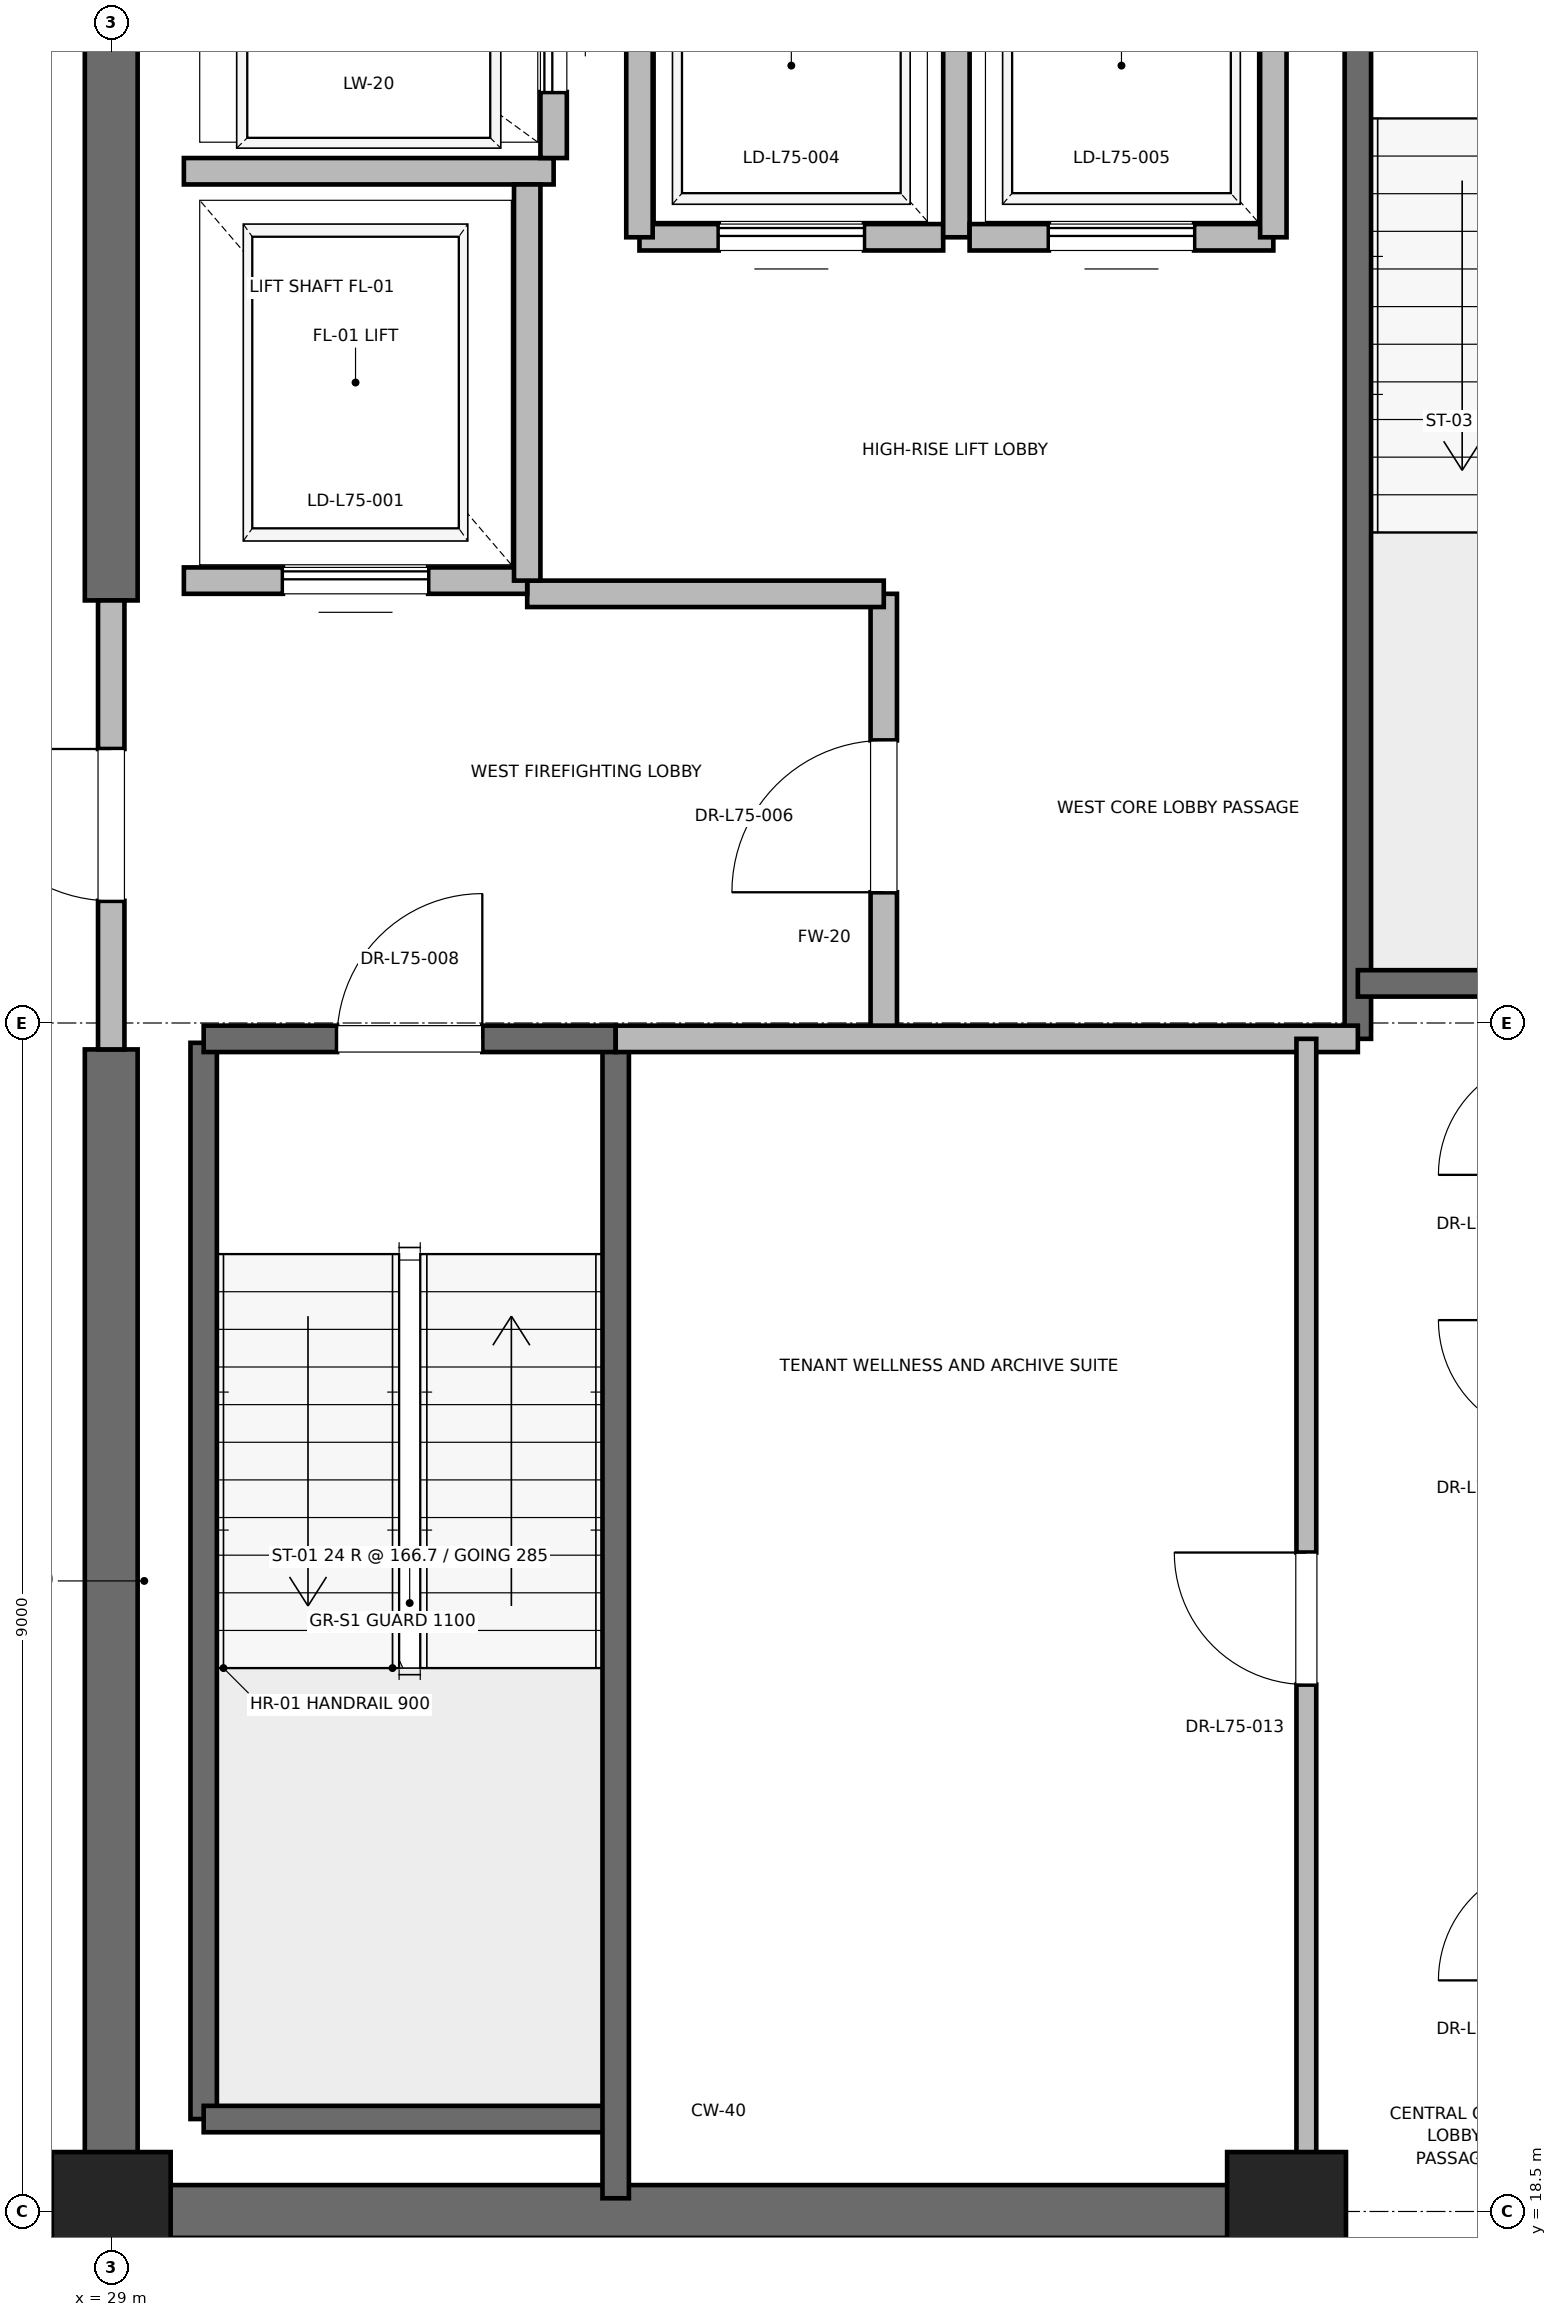
"""IFC4 building model, lengths in metres.
Left out: names, types, materials, properties, quantities, classifications, styles, units other than length and angle.
Written with IfcOpenShell. Run it as: python <this file> out.ifc"""

import sys

from ifc_helpers import new_model, si_unit, direction, frame, frame_2d, origin, origin_2d, place, context, subcontext, project, spatial, rectangle, extrude, element, fill, save


model = new_model("IFC4")
c1 = context("Model", 3, precision=1e-05, world=origin(), true_north=direction((0.0, 1.0)))
c2 = subcontext(c1, "Body", "Model", "MODEL_VIEW")
j1 = project(units=[si_unit("LENGTHUNIT", "METRE"), si_unit("PLANEANGLEUNIT", "RADIAN")], contexts=[c1])
p1 = place(None, origin())
s1 = spatial("IfcSite", under=j1, at=p1, CompositionType="ELEMENT")
p2 = place(p1, origin())
s2 = spatial("IfcBuilding", under=s1, at=p2, CompositionType="ELEMENT")
p3 = place(p2, frame((0.0, 0.0, 322.8)))
s3 = spatial("IfcBuildingStorey", under=s2, at=p3, CompositionType="ELEMENT", Elevation=322.8)
for number, where, z_axis, x_axis in (
    (1, (29.0, 18.5, 0.0), (0.0, 0.0, 1.0), (1.0, 0.0, 0.0)),
    (2, (37.9, 18.5, 0.0), (0.0, 0.0, 1.0), (1.0, 0.0, 0.0)),
):
    element("IfcColumn", number, at=place(p3, frame(where, z_axis=z_axis, x_axis=x_axis)), inside=s3, PredefinedType="PILASTER", context=c2, shape_type="SweptSolid", body=[
        extrude(rectangle(XDim=0.9, YDim=0.9, at=origin_2d()), origin(), (0.0, 0.0, 1.0), 4.0),
    ])
p4 = place(p3, frame((29.0, 18.5, 0.0), z_axis=(0.0, 0.0, 1.0), x_axis=(1.0, 0.0, 0.0)))
e3 = element("IfcWall", 3, at=p4, inside=s3, PredefinedType="SHEAR", context=c2, shape_type="SweptSolid", body=[
    extrude(rectangle(XDim=9.2, YDim=0.4, at=frame_2d((4.6, 0.0))), origin(), (0.0, 0.0, 1.0), 3.785),
])
p5 = place(p3, frame((29.0, 18.5, 0.0), z_axis=(0.0, 0.0, 1.0), x_axis=(0.0, 1.0, 0.0)))
e4 = element("IfcWall", 4, at=p5, inside=s3, PredefinedType="SHEAR", context=c2, shape_type="SweptSolid", body=[
    extrude(rectangle(XDim=8.8, YDim=0.4, at=frame_2d((4.4, 0.0))), origin(), (0.0, 0.0, 1.0), 3.785),
])
p6 = place(p3, frame((29.0, 30.7, 0.0), z_axis=(0.0, 0.0, 1.0), x_axis=(0.0, 1.0, 0.0)))
e5 = element("IfcWall", 5, at=p6, inside=s3, PredefinedType="SHEAR", context=c2, shape_type="SweptSolid", body=[
    extrude(rectangle(XDim=5.8, YDim=0.4, at=frame_2d((2.9, 0.0))), origin(), (0.0, 0.0, 1.0), 3.785),
])
p7 = place(p3, frame((29.7, 19.2, 0.0), z_axis=(0.0, 0.0, 1.0), x_axis=(0.0, 1.0, 0.0)))
e6 = element("IfcWall", 6, at=p7, inside=s3, PredefinedType="SOLIDWALL", context=c2, shape_type="SweptSolid", body=[
    extrude(rectangle(XDim=8.15, YDim=0.2, at=frame_2d((4.075, 0.0))), origin(), (0.0, 0.0, 1.0), 3.785),
])
p8 = place(p3, frame((29.7, 19.2, 0.0), z_axis=(0.0, 0.0, 1.0), x_axis=(1.0, 0.0, 0.0)))
e7 = element("IfcWall", 7, at=p8, inside=s3, PredefinedType="SOLIDWALL", context=c2, shape_type="SweptSolid", body=[
    extrude(rectangle(XDim=3.12, YDim=0.2, at=frame_2d((1.56, 0.0))), origin(), (0.0, 0.0, 1.0), 3.785),
])
p9 = place(p3, frame((32.82, 18.6, 0.0), z_axis=(0.0, 0.0, 1.0), x_axis=(0.0, 1.0, 0.0)))
e8 = element("IfcWall", 8, at=p9, inside=s3, PredefinedType="SOLIDWALL", context=c2, shape_type="SweptSolid", body=[
    extrude(rectangle(XDim=8.78, YDim=0.2, at=frame_2d((4.39, 0.0))), origin(), (0.0, 0.0, 1.0), 3.785),
])
p10 = place(p3, frame((29.7, 27.38, 0.0), z_axis=(0.0, 0.0, 1.0), x_axis=(1.0, 0.0, 0.0)))
e9 = element("IfcWall", 9, at=p10, inside=s3, PredefinedType="SOLIDWALL", context=c2, shape_type="SweptSolid", body=[
    extrude(rectangle(XDim=3.12, YDim=0.2, at=frame_2d((1.56, 0.0))), origin(), (0.0, 0.0, 1.0), 3.785),
])
p11 = place(p10, frame((1.01, 0.0, 0.0)))
e10 = element("IfcOpeningElement", 10, at=p11, cuts=e9, PredefinedType="OPENING", context=c2, shape_type="SweptSolid", body=[
    extrude(rectangle(XDim=1.1, YDim=2.15, at=frame_2d((0.55, 1.075))), frame((0.0, 0.1, 0.0), z_axis=(0.0, -1.0, 0.0), x_axis=(1.0, 0.0, 0.0)), (0.0, 0.0, 1.0), 0.2),
])
p12 = place(p3, frame((38.44, 27.38, 0.0), z_axis=(0.0, 0.0, 1.0), x_axis=(0.0, 1.0, 0.0)))
e11 = element("IfcWall", 11, at=p12, inside=s3, PredefinedType="SOLIDWALL", context=c2, shape_type="SweptSolid", body=[
    extrude(rectangle(XDim=8.87, YDim=0.2, at=frame_2d((4.435, 0.0))), origin(), (0.0, 0.0, 1.0), 3.785),
])
p13 = place(p3, frame((38.44, 27.8, 0.0), z_axis=(0.0, 0.0, 1.0), x_axis=(1.0, 0.0, 0.0)))
e12 = element("IfcWall", 12, at=p13, inside=s3, PredefinedType="SOLIDWALL", context=c2, shape_type="SweptSolid", body=[
    extrude(rectangle(XDim=3.32, YDim=0.2, at=frame_2d((1.66, 0.0))), origin(), (0.0, 0.0, 1.0), 3.785),
])
p14 = place(p3, frame((34.85, 27.38, 0.0), z_axis=(0.0, 0.0, 1.0), x_axis=(0.0, 1.0, 0.0)))
e13 = element("IfcWall", 13, at=p14, inside=s3, PredefinedType="PARTITIONING", context=c2, shape_type="SweptSolid", body=[
    extrude(rectangle(XDim=3.37, YDim=0.2, at=frame_2d((1.685, 0.0))), origin(), (0.0, 0.0, 1.0), 3.785),
])
p15 = place(p14, frame((1.11, 0.0, 0.0)))
e14 = element("IfcOpeningElement", 14, at=p15, cuts=e13, PredefinedType="OPENING", context=c2, shape_type="SweptSolid", body=[
    extrude(rectangle(XDim=1.15, YDim=2.2, at=frame_2d((0.575, 1.1))), frame((0.0, 0.1, 0.0), z_axis=(0.0, -1.0, 0.0), x_axis=(1.0, 0.0, 0.0)), (0.0, 0.0, 1.0), 0.2),
])
p16 = place(p3, frame((29.0, 27.3, 0.0), z_axis=(0.0, 0.0, 1.0), x_axis=(0.0, 1.0, 0.0)))
e15 = element("IfcWall", 15, at=p16, inside=s3, PredefinedType="PARTITIONING", context=c2, shape_type="SweptSolid", body=[
    extrude(rectangle(XDim=3.4, YDim=0.2, at=frame_2d((1.7, 0.0))), origin(), (0.0, 0.0, 1.0), 2.865),
])
p17 = place(p16, frame((1.125, 0.0, 0.0)))
e16 = element("IfcOpeningElement", 16, at=p17, cuts=e15, PredefinedType="OPENING", context=c2, shape_type="SweptSolid", body=[
    extrude(rectangle(XDim=1.15, YDim=2.2, at=frame_2d((0.575, 1.1))), frame((0.0, 0.1, 0.0), z_axis=(0.0, -1.0, 0.0), x_axis=(1.0, 0.0, 0.0)), (0.0, 0.0, 1.0), 0.2),
])
p18 = place(p3, frame((32.82, 27.38, 0.0), z_axis=(0.0, 0.0, 1.0), x_axis=(1.0, 0.0, 0.0)))
e17 = element("IfcWall", 17, at=p18, inside=s3, PredefinedType="PARTITIONING", context=c2, shape_type="SweptSolid", body=[
    extrude(rectangle(XDim=5.62, YDim=0.2, at=frame_2d((2.81, 0.0))), origin(), (0.0, 0.0, 1.0), 3.785),
])
p19 = place(p3, frame((32.15, 30.75, 0.0), z_axis=(0.0, 0.0, 1.0), x_axis=(1.0, 0.0, 0.0)))
e18 = element("IfcWall", 18, at=p19, inside=s3, PredefinedType="PARTITIONING", context=c2, shape_type="SweptSolid", body=[
    extrude(rectangle(XDim=2.7, YDim=0.2, at=frame_2d((1.35, 0.0))), origin(), (0.0, 0.0, 1.0), 3.785),
])
p20 = place(p3, frame((29.55, 30.85, 0.0), z_axis=(0.0, 0.0, 1.0), x_axis=(1.0, 0.0, 0.0)))
e19 = element("IfcWall", 19, at=p20, inside=s3, PredefinedType="SOLIDWALL", context=c2, shape_type="SweptSolid", body=[
    extrude(rectangle(XDim=2.6, YDim=0.2, at=frame_2d((1.3, 0.0))), origin(), (0.0, 0.0, 1.0), 2.865),
])
p21 = place(p20, frame((0.75, 0.0, 0.0)))
e20 = element("IfcOpeningElement", 20, at=p21, cuts=e19, PredefinedType="OPENING", context=c2, shape_type="SweptSolid", body=[
    extrude(rectangle(XDim=1.1, YDim=2.2, at=frame_2d((0.55, 1.1))), frame((0.0, 0.1, 0.0), z_axis=(0.0, -1.0, 0.0), x_axis=(1.0, 0.0, 0.0)), (0.0, 0.0, 1.0), 0.2),
])
p22 = place(p3, frame((29.55, 33.95, 0.0), z_axis=(0.0, 0.0, 1.0), x_axis=(1.0, 0.0, 0.0)))
e21 = element("IfcWall", 21, at=p22, inside=s3, PredefinedType="SOLIDWALL", context=c2, shape_type="SweptSolid", body=[
    extrude(rectangle(XDim=2.8, YDim=0.2, at=frame_2d((1.4, 0.0))), origin(), (0.0, 0.0, 1.0), 3.785),
])
p23 = place(p3, frame((32.15, 30.85, 0.0), z_axis=(0.0, 0.0, 1.0), x_axis=(0.0, 1.0, 0.0)))
e22 = element("IfcWall", 22, at=p23, inside=s3, PredefinedType="SOLIDWALL", context=c2, shape_type="SweptSolid", body=[
    extrude(rectangle(XDim=3.0, YDim=0.2, at=frame_2d((1.5, 0.0))), origin(), (0.0, 0.0, 1.0), 3.785),
])
p24 = place(p3, frame((32.35, 34.05, 0.0), z_axis=(0.0, 0.0, 1.0), x_axis=(0.0, 1.0, 0.0)))
e23 = element("IfcWall", 23, at=p24, inside=s3, PredefinedType="SOLIDWALL", context=c2, shape_type="SweptSolid", body=[
    extrude(rectangle(XDim=2.1, YDim=0.2, at=frame_2d((1.05, 0.0))), origin(), (0.0, 0.0, 1.0), 3.785),
])
p25 = place(p24, frame((0.5, 0.0, 0.0)))
e24 = element("IfcOpeningElement", 24, at=p25, cuts=e23, PredefinedType="OPENING", context=c2, shape_type="SweptSolid", body=[
    extrude(rectangle(XDim=1.1, YDim=2.2, at=frame_2d((0.55, 1.1))), frame((0.0, 0.1, 0.0), z_axis=(0.0, -1.0, 0.0), x_axis=(1.0, 0.0, 0.0)), (0.0, 0.0, 1.0), 0.2),
])
p26 = place(p3, frame((33.0, 33.45, 0.0), z_axis=(0.0, 0.0, 1.0), x_axis=(1.0, 0.0, 0.0)))
e25 = element("IfcWall", 25, at=p26, inside=s3, PredefinedType="SOLIDWALL", context=c2, shape_type="SweptSolid", body=[
    extrude(rectangle(XDim=2.3, YDim=0.2, at=frame_2d((1.15, 0.0))), origin(), (0.0, 0.0, 1.0), 3.785),
])
p27 = place(p26, frame((0.6, 0.0, 0.0)))
e26 = element("IfcOpeningElement", 26, at=p27, cuts=e25, PredefinedType="OPENING", context=c2, shape_type="SweptSolid", body=[
    extrude(rectangle(XDim=1.1, YDim=2.2, at=frame_2d((0.55, 1.1))), frame((0.0, 0.1, 0.0), z_axis=(0.0, -1.0, 0.0), x_axis=(1.0, 0.0, 0.0)), (0.0, 0.0, 1.0), 0.2),
])
p28 = place(p3, frame((33.0, 36.05, 0.0), z_axis=(0.0, 0.0, 1.0), x_axis=(0.0, -1.0, 0.0)))
e27 = element("IfcWall", 27, at=p28, inside=s3, PredefinedType="SOLIDWALL", context=c2, shape_type="SweptSolid", body=[
    extrude(rectangle(XDim=2.6, YDim=0.2, at=frame_2d((1.3, 0.0))), origin(), (0.0, 0.0, 1.0), 3.785),
])
p29 = place(p3, frame((35.4, 33.45, 0.0), z_axis=(0.0, 0.0, 1.0), x_axis=(0.0, 1.0, 0.0)))
e28 = element("IfcWall", 28, at=p29, inside=s3, PredefinedType="SOLIDWALL", context=c2, shape_type="SweptSolid", body=[
    extrude(rectangle(XDim=2.6, YDim=0.2, at=frame_2d((1.3, 0.0))), origin(), (0.0, 0.0, 1.0), 2.865),
])
p30 = place(p3, frame((35.5, 33.45, 0.0), z_axis=(0.0, 0.0, 1.0), x_axis=(1.0, 0.0, 0.0)))
e29 = element("IfcWall", 29, at=p30, inside=s3, PredefinedType="SOLIDWALL", context=c2, shape_type="SweptSolid", body=[
    extrude(rectangle(XDim=2.3, YDim=0.2, at=frame_2d((1.15, 0.0))), origin(), (0.0, 0.0, 1.0), 3.785),
])
p31 = place(p30, frame((0.6, 0.0, 0.0)))
e30 = element("IfcOpeningElement", 30, at=p31, cuts=e29, PredefinedType="OPENING", context=c2, shape_type="SweptSolid", body=[
    extrude(rectangle(XDim=1.1, YDim=2.2, at=frame_2d((0.55, 1.1))), frame((0.0, 0.1, 0.0), z_axis=(0.0, -1.0, 0.0), x_axis=(1.0, 0.0, 0.0)), (0.0, 0.0, 1.0), 0.2),
])
p32 = place(p3, frame((37.8, 33.45, 0.0), z_axis=(0.0, 0.0, 1.0), x_axis=(0.0, 1.0, 0.0)))
e31 = element("IfcWall", 31, at=p32, inside=s3, PredefinedType="SOLIDWALL", context=c2, shape_type="SweptSolid", body=[
    extrude(rectangle(XDim=2.6, YDim=0.2, at=frame_2d((1.3, 0.0))), origin(), (0.0, 0.0, 1.0), 2.865),
])
p33 = place(p3, frame((38.05, 18.6, 0.0), z_axis=(0.0, 0.0, 1.0), x_axis=(0.0, 1.0, 0.0)))
e32 = element("IfcWall", 32, at=p33, inside=s3, PredefinedType="PARTITIONING", context=c2, shape_type="SweptSolid", body=[
    extrude(rectangle(XDim=8.78, YDim=0.15, at=frame_2d((4.39, 0.0))), origin(), (0.0, 0.0, 1.0), 2.85),
])
p34 = place(p33, frame((3.89, 0.0, 0.0)))
e33 = element("IfcOpeningElement", 33, at=p34, cuts=e32, PredefinedType="OPENING", context=c2, shape_type="SweptSolid", body=[
    extrude(rectangle(XDim=1.0, YDim=2.15, at=frame_2d((0.5, 1.075))), frame((0.0, 0.075, 0.0), z_axis=(0.0, -1.0, 0.0), x_axis=(1.0, 0.0, 0.0)), (0.0, 0.0, 1.0), 0.15),
])
p35 = place(p11, origin())
e34 = element("IfcDoor", 34, at=p35, inside=s3, OperationType="SINGLE_SWING_RIGHT", PredefinedType="DOOR", context=c2, shape_type="SweptSolid", body=[
    extrude(rectangle(XDim=1.1, YDim=2.15, at=frame_2d((0.55, 1.075))), frame((0.0, 0.025, 0.0), z_axis=(0.0, -1.0, 0.0), x_axis=(1.0, 0.0, 0.0)), (0.0, 0.0, 1.0), 0.05),
])
fill(e10, e34)
p36 = place(p15, origin())
e35 = element("IfcDoor", 35, at=p36, inside=s3, OperationType="SINGLE_SWING_LEFT", PredefinedType="DOOR", context=c2, shape_type="SweptSolid", body=[
    extrude(rectangle(XDim=1.15, YDim=2.2, at=frame_2d((0.575, 1.1))), frame((0.0, 0.025, 0.0), z_axis=(0.0, -1.0, 0.0), x_axis=(1.0, 0.0, 0.0)), (0.0, 0.0, 1.0), 0.05),
])
fill(e14, e35)
p37 = place(p17, origin())
e36 = element("IfcDoor", 36, at=p37, inside=s3, OperationType="SINGLE_SWING_RIGHT", PredefinedType="DOOR", context=c2, shape_type="SweptSolid", body=[
    extrude(rectangle(XDim=1.15, YDim=2.2, at=frame_2d((0.575, 1.1))), frame((0.0, 0.025, 0.0), z_axis=(0.0, -1.0, 0.0), x_axis=(1.0, 0.0, 0.0)), (0.0, 0.0, 1.0), 0.05),
])
fill(e16, e36)
p38 = place(p21, origin())
e37 = element("IfcDoor", 37, at=p38, inside=s3, OperationType="SLIDING_TO_RIGHT", PredefinedType="DOOR", context=c2, shape_type="SweptSolid", body=[
    extrude(rectangle(XDim=1.1, YDim=2.2, at=frame_2d((0.55, 1.1))), frame((0.0, 0.025, 0.0), z_axis=(0.0, -1.0, 0.0), x_axis=(1.0, 0.0, 0.0)), (0.0, 0.0, 1.0), 0.05),
])
fill(e20, e37)
p39 = place(p25, origin())
e38 = element("IfcDoor", 38, at=p39, inside=s3, OperationType="SLIDING_TO_RIGHT", PredefinedType="DOOR", context=c2, shape_type="SweptSolid", body=[
    extrude(rectangle(XDim=1.1, YDim=2.2, at=frame_2d((0.55, 1.1))), frame((0.0, 0.025, 0.0), z_axis=(0.0, -1.0, 0.0), x_axis=(1.0, 0.0, 0.0)), (0.0, 0.0, 1.0), 0.05),
])
fill(e24, e38)
p40 = place(p27, origin())
e39 = element("IfcDoor", 39, at=p40, inside=s3, OperationType="SLIDING_TO_RIGHT", PredefinedType="DOOR", context=c2, shape_type="SweptSolid", body=[
    extrude(rectangle(XDim=1.1, YDim=2.2, at=frame_2d((0.55, 1.1))), frame((0.0, 0.025, 0.0), z_axis=(0.0, -1.0, 0.0), x_axis=(1.0, 0.0, 0.0)), (0.0, 0.0, 1.0), 0.05),
])
fill(e26, e39)
p41 = place(p31, origin())
e40 = element("IfcDoor", 40, at=p41, inside=s3, OperationType="SLIDING_TO_RIGHT", PredefinedType="DOOR", context=c2, shape_type="SweptSolid", body=[
    extrude(rectangle(XDim=1.1, YDim=2.2, at=frame_2d((0.55, 1.1))), frame((0.0, 0.025, 0.0), z_axis=(0.0, -1.0, 0.0), x_axis=(1.0, 0.0, 0.0)), (0.0, 0.0, 1.0), 0.05),
])
fill(e30, e40)
p42 = place(p34, origin())
e41 = element("IfcDoor", 41, at=p42, inside=s3, OperationType="SINGLE_SWING_RIGHT", PredefinedType="DOOR", context=c2, shape_type="SweptSolid", body=[
    extrude(rectangle(XDim=1.0, YDim=2.15, at=frame_2d((0.5, 1.075))), frame((0.0, 0.025, 0.0), z_axis=(0.0, -1.0, 0.0), x_axis=(1.0, 0.0, 0.0)), (0.0, 0.0, 1.0), 0.05),
])
fill(e33, e41)
save(model, sys.argv[1])
